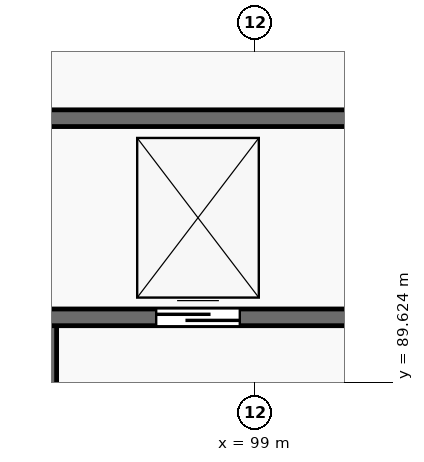
"""IFC4 building model, lengths in metres.
Left out: names, types, materials, properties, quantities, classifications, styles, units other than length and angle.
Written with IfcOpenShell. Run it as: python <this file> out.ifc"""

import sys

from ifc_helpers import new_model, si_unit, direction, frame, frame_2d, origin, place, context, subcontext, project, spatial, rectangle, extrude, element, fill, save


model = new_model("IFC4")
c1 = context("Model", 3, precision=1e-05, world=origin(), true_north=direction((0.0, 1.0)))
c2 = subcontext(c1, "Body", "Model", "MODEL_VIEW")
j1 = project(units=[si_unit("LENGTHUNIT", "METRE"), si_unit("PLANEANGLEUNIT", "RADIAN")], contexts=[c1])
p1 = place(None, origin())
s1 = spatial("IfcSite", under=j1, at=p1, CompositionType="ELEMENT")
p2 = place(p1, origin())
s2 = spatial("IfcBuilding", under=s1, at=p2, CompositionType="ELEMENT")
p3 = place(p2, frame((0.0, 0.0, -4.5)))
s3 = spatial("IfcBuildingStorey", under=s2, at=p3, CompositionType="ELEMENT", Elevation=-4.5)
p4 = place(p3, frame((96.27, 86.4, 0.0), z_axis=(0.0, 0.0, 1.0), x_axis=(0.0, 1.0, 0.0)))
e1 = element("IfcWall", 1, at=p4, inside=s3, PredefinedType="SHEAR", context=c2, shape_type="SweptSolid", body=[
    extrude(rectangle(XDim=4.0, YDim=0.24, at=frame_2d((2.0, 0.0))), origin(), (0.0, 0.0, 1.0), 4.5),
])
p5 = place(p4, frame((1.3, 0.0, 0.0)))
e2 = element("IfcOpeningElement", 2, at=p5, cuts=e1, PredefinedType="OPENING", context=c2, shape_type="SweptSolid", body=[
    extrude(rectangle(XDim=1.4, YDim=2.2, at=frame_2d((0.7, 1.1))), frame((0.0, 0.135, 0.0), z_axis=(0.0, -1.0, 0.0), x_axis=(1.0, 0.0, 0.0)), (0.0, 0.0, 1.0), 0.27),
])
p6 = place(p3, frame((96.17, 90.48, 0.0), z_axis=(0.0, 0.0, 1.0), x_axis=(1.0, 0.0, 0.0)))
e3 = element("IfcWall", 3, at=p6, inside=s3, PredefinedType="SHEAR", context=c2, shape_type="SweptSolid", body=[
    extrude(rectangle(XDim=4.16, YDim=0.22, at=frame_2d((2.08, 0.0))), origin(), (0.0, 0.0, 1.0), 4.5),
])
p7 = place(p6, frame((1.53, 0.0, 0.0)))
e4 = element("IfcOpeningElement", 4, at=p7, cuts=e3, PredefinedType="OPENING", context=c2, shape_type="SweptSolid", body=[
    extrude(rectangle(XDim=1.1, YDim=2.15, at=frame_2d((0.55, 1.075))), frame((0.0, 0.125, 0.0), z_axis=(0.0, -1.0, 0.0), x_axis=(1.0, 0.0, 0.0)), (0.0, 0.0, 1.0), 0.25),
])
p8 = place(p3, frame((96.17, 93.1, 0.0), z_axis=(0.0, 0.0, 1.0), x_axis=(1.0, 0.0, 0.0)))
e5 = element("IfcWall", 5, at=p8, inside=s3, PredefinedType="SHEAR", context=c2, shape_type="SweptSolid", body=[
    extrude(rectangle(XDim=4.16, YDim=0.22, at=frame_2d((2.08, 0.0))), origin(), (0.0, 0.0, 1.0), 4.5),
])
p9 = place(p7, origin())
e6 = element("IfcDoor", 6, at=p9, inside=s3, OperationType="SLIDING_TO_LEFT", PredefinedType="DOOR", context=c2, shape_type="SweptSolid", body=[
    extrude(rectangle(XDim=1.1, YDim=2.15, at=frame_2d((0.55, 1.075))), frame((0.0, 0.025, 0.0), z_axis=(0.0, -1.0, 0.0), x_axis=(1.0, 0.0, 0.0)), (0.0, 0.0, 1.0), 0.05),
])
fill(e4, e6)
save(model, sys.argv[1])
